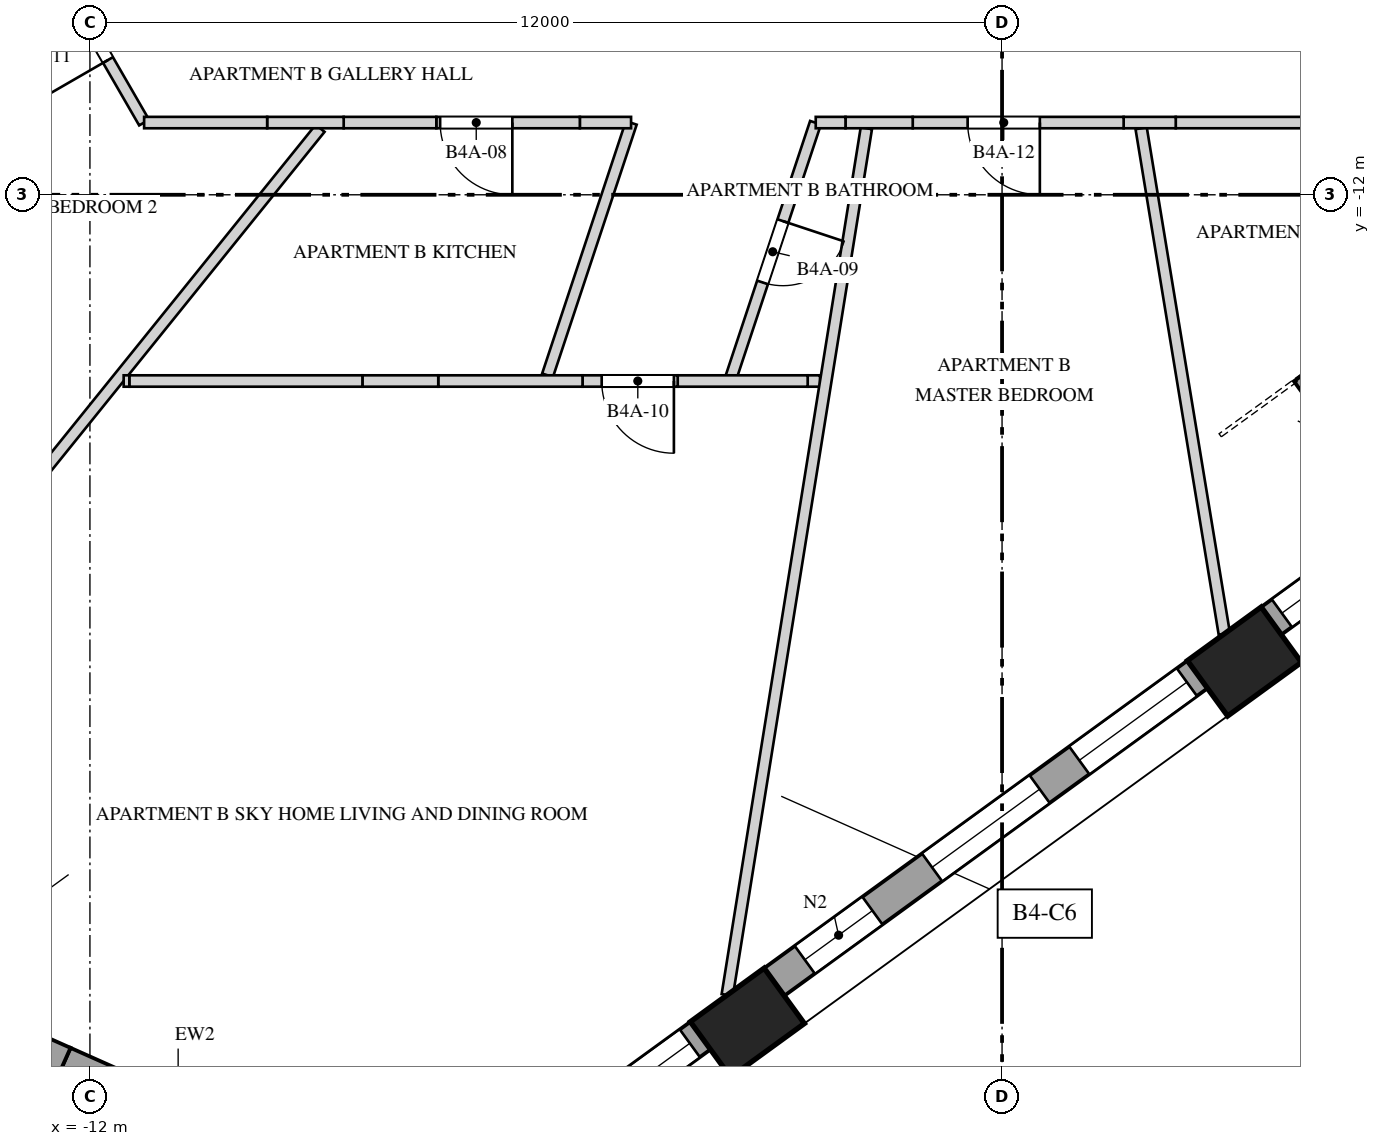
"""IFC4 building model, lengths in metres.
Left out: names, types, materials, properties, quantities, classifications, styles, units other than length and angle.
Written with IfcOpenShell. Run it as: python <this file> out.ifc"""

import sys

from ifc_helpers import new_model, si_unit, direction, frame, frame_2d, origin, origin_2d, place, context, subcontext, project, spatial, polyline, rectangle, outline, extrude, element, fill, save


model = new_model("IFC4")
c1 = context("Model", 3, precision=1e-05, world=origin(), true_north=direction((0.0, 1.0)))
c2 = subcontext(c1, "Body", "Model", "MODEL_VIEW")
j1 = project(units=[si_unit("LENGTHUNIT", "METRE"), si_unit("PLANEANGLEUNIT", "RADIAN")], contexts=[c1])
p1 = place(None, origin())
s1 = spatial("IfcSite", under=j1, at=p1, CompositionType="ELEMENT")
p2 = place(p1, origin())
s2 = spatial("IfcBuilding", under=s1, at=p2, CompositionType="ELEMENT")
p3 = place(p2, frame((0.0, 0.0, 162.8)))
s3 = spatial("IfcBuildingStorey", under=s2, at=p3, CompositionType="ELEMENT", Elevation=162.8)
for number, where, z_axis, x_axis in (
    (1, (-3.351, -22.891, -0.35), (0.0, 0.0, 1.0), (0.809, 0.588, 0.0)),
    (2, (3.189, -18.14, -0.35), (0.0, 0.0, 1.0), (0.809, 0.588, 0.0)),
):
    element("IfcColumn", number, at=place(p3, frame(where, z_axis=z_axis, x_axis=x_axis)), inside=s3, PredefinedType="COLUMN", context=c2, shape_type="SweptSolid", body=[
        extrude(rectangle(XDim=1.2, YDim=0.9, at=origin_2d()), origin(), (0.0, 0.0, 1.0), 4.35),
    ])
p4 = place(p3, frame((-8.97, -26.696, 0.0), z_axis=(0.0, 0.0, 1.0), x_axis=(0.809024567544, 0.587774828578, 0.0)))
e3 = element("IfcWall", 3, at=p4, inside=s3, PredefinedType="SOLIDWALL", context=c2, shape_type="SweptSolid", body=[
    extrude(rectangle(XDim=6.183, YDim=0.45, at=frame_2d((3.091, 0.0))), origin(), (0.0, 0.0, 1.0), 3.3),
])
p5 = place(p4, frame((0.147, 0.0, 0.5)))
e4 = element("IfcOpeningElement", 4, at=p5, cuts=e3, PredefinedType="OPENING", context=c2, shape_type="SweptSolid", body=[
    extrude(rectangle(XDim=1.1, YDim=2.0, at=frame_2d((0.55, 1.0))), frame((0.0, 0.235, 0.0), z_axis=(0.0, -1.0, 0.0), x_axis=(1.0, 0.0, 0.0)), (0.0, 0.0, 1.0), 0.47),
])
p6 = place(p4, frame((1.866, 0.0, 0.5)))
e5 = element("IfcOpeningElement", 5, at=p6, cuts=e3, PredefinedType="OPENING", context=c2, shape_type="SweptSolid", body=[
    extrude(rectangle(XDim=1.75, YDim=2.65, at=frame_2d((0.875, 1.325))), frame((0.0, 0.235, 0.0), z_axis=(0.0, -1.0, 0.0), x_axis=(1.0, 0.0, 0.0)), (0.0, 0.0, 1.0), 0.47),
])
p7 = place(p4, frame((4.261, 0.0, 0.5)))
e6 = element("IfcOpeningElement", 6, at=p7, cuts=e3, PredefinedType="OPENING", context=c2, shape_type="SweptSolid", body=[
    extrude(rectangle(XDim=1.75, YDim=2.65, at=frame_2d((0.875, 1.325))), frame((0.0, 0.235, 0.0), z_axis=(0.0, -1.0, 0.0), x_axis=(1.0, 0.0, 0.0)), (0.0, 0.0, 1.0), 0.47),
])
p8 = place(p3, frame((-2.997, -22.356, 0.0), z_axis=(0.0, 0.0, 1.0), x_axis=(0.809016690404, 0.587785670672, 0.0)))
e7 = element("IfcWall", 7, at=p8, inside=s3, PredefinedType="SOLIDWALL", context=c2, shape_type="SweptSolid", body=[
    extrude(rectangle(XDim=6.883, YDim=0.45, at=frame_2d((3.441, 0.0))), origin(), (0.0, 0.0, 1.0), 3.3),
])
p9 = place(p8, frame((0.497, 0.0, 0.5)))
e8 = element("IfcOpeningElement", 8, at=p9, cuts=e7, PredefinedType="OPENING", context=c2, shape_type="SweptSolid", body=[
    extrude(rectangle(XDim=1.1, YDim=2.65, at=frame_2d((0.55, 1.325))), frame((0.0, 0.235, 0.0), z_axis=(0.0, -1.0, 0.0), x_axis=(1.0, 0.0, 0.0)), (0.0, 0.0, 1.0), 0.47),
])
p10 = place(p8, frame((2.566, 0.0, 0.5)))
e9 = element("IfcOpeningElement", 9, at=p10, cuts=e7, PredefinedType="OPENING", context=c2, shape_type="SweptSolid", body=[
    extrude(rectangle(XDim=1.75, YDim=2.65, at=frame_2d((0.875, 1.325))), frame((0.0, 0.235, 0.0), z_axis=(0.0, -1.0, 0.0), x_axis=(1.0, 0.0, 0.0)), (0.0, 0.0, 1.0), 0.47),
])
p11 = place(p8, frame((4.961, 0.0, 0.5)))
e10 = element("IfcOpeningElement", 10, at=p11, cuts=e7, PredefinedType="OPENING", context=c2, shape_type="SweptSolid", body=[
    extrude(rectangle(XDim=1.75, YDim=2.65, at=frame_2d((0.875, 1.325))), frame((0.0, 0.235, 0.0), z_axis=(0.0, -1.0, 0.0), x_axis=(1.0, 0.0, 0.0)), (0.0, 0.0, 1.0), 0.47),
])
p12 = place(p3, frame((3.542, -17.605, 0.0), z_axis=(0.0, 0.0, 1.0), x_axis=(0.809028366311, 0.587769599847, 0.0)))
e11 = element("IfcWall", 11, at=p12, inside=s3, PredefinedType="SOLIDWALL", context=c2, shape_type="SweptSolid", body=[
    extrude(rectangle(XDim=2.094, YDim=0.45, at=frame_2d((1.047, 0.0))), origin(), (0.0, 0.0, 1.0), 3.3),
])
p13 = place(p12, frame((0.172, 0.0, 0.5)))
e12 = element("IfcOpeningElement", 12, at=p13, cuts=e11, PredefinedType="OPENING", context=c2, shape_type="SweptSolid", body=[
    extrude(rectangle(XDim=1.75, YDim=2.65, at=frame_2d((0.875, 1.325))), frame((0.0, 0.235, 0.0), z_axis=(0.0, -1.0, 0.0), x_axis=(1.0, 0.0, 0.0)), (0.0, 0.0, 1.0), 0.47),
])
p14 = place(p3, frame((5.754, -16.833, 0.0), z_axis=(0.0, 0.0, 1.0), x_axis=(-0.587776590479, 0.80902328748, 0.0)))
e13 = element("IfcWall", 13, at=p14, inside=s3, PredefinedType="SOLIDWALL", context=c2, shape_type="SweptSolid", body=[
    extrude(rectangle(XDim=3.05, YDim=0.3, at=frame_2d((1.525, 0.0))), origin(), (0.0, 0.0, 1.0), 3.3),
])
p15 = place(p3, frame((-9.241, -25.058, 0.0), z_axis=(0.0, 0.0, 1.0), x_axis=(-0.913549606868, 0.406727323635, 0.0)))
e14 = element("IfcWall", 14, at=p15, inside=s3, PredefinedType="SOLIDWALL", context=c2, shape_type="SweptSolid", body=[
    extrude(rectangle(XDim=3.5, YDim=0.9, at=frame_2d((1.75, 0.0))), origin(), (0.0, 0.0, 1.0), 3.3),
])
p16 = place(p15, frame((0.75, 0.0, 0.0)))
e15 = element("IfcOpeningElement", 15, at=p16, cuts=e14, PredefinedType="OPENING", context=c2, shape_type="SweptSolid", body=[
    extrude(rectangle(XDim=2.0, YDim=2.4, at=frame_2d((1.0, 1.2))), frame((0.0, 0.46, 0.0), z_axis=(0.0, -1.0, 0.0), x_axis=(1.0, 0.0, 0.0)), (0.0, 0.0, 1.0), 0.92),
])
p17 = place(p3, frame((-13.184, -24.757, 0.0), z_axis=(0.0, 0.0, 1.0), x_axis=(0.406698557215, 0.913562413609, 0.0)))
e16 = element("IfcWall", 16, at=p17, inside=s3, PredefinedType="SOLIDWALL", context=c2, shape_type="SweptSolid", body=[
    extrude(rectangle(XDim=1.779, YDim=0.45, at=frame_2d((0.89, 0.0))), origin(), (0.0, 0.0, 1.0), 2.55),
])
p18 = place(p3, frame((-14.322, -17.76, 0.0), z_axis=(0.0, 0.0, 1.0), x_axis=(0.627722219301, 0.778437419062, 0.0)))
e17 = element("IfcWall", 17, at=p18, inside=s3, PredefinedType="PARTITIONING", context=c2, shape_type="SweptSolid", body=[
    extrude(rectangle(XDim=8.524, YDim=0.15, at=frame_2d((4.262, 0.0))), origin(), (0.0, 0.0, 1.0), 2.75),
])
p19 = place(p3, frame((-11.287, -11.05, 0.0), z_axis=(0.0, 0.0, 1.0), x_axis=(-0.499958377808, 0.866049433035, 0.0)))
e18 = element("IfcWall", 18, at=p19, inside=s3, PredefinedType="PARTITIONING", context=c2, shape_type="SweptSolid", body=[
    extrude(rectangle(XDim=3.046, YDim=0.15, at=frame_2d((1.523, 0.0))), origin(), (0.0, 0.0, 1.0), 3.65),
])
p20 = place(p19, frame((0.95, 0.0, 0.0)))
e19 = element("IfcOpeningElement", 19, at=p20, cuts=e18, PredefinedType="OPENING", context=c2, shape_type="SweptSolid", body=[
    extrude(rectangle(XDim=0.95, YDim=2.4, at=frame_2d((0.475, 1.2))), frame((0.0, 0.085, 0.0), z_axis=(0.0, -1.0, 0.0), x_axis=(1.0, 0.0, 0.0)), (0.0, 0.0, 1.0), 0.17),
])
p21 = place(p3, frame((-5.979, -14.375, 0.0), z_axis=(0.0, 0.0, 1.0), x_axis=(0.314824942326, 0.94914975409, 0.0)))
e20 = element("IfcWall", 20, at=p21, inside=s3, PredefinedType="PARTITIONING", context=c2, shape_type="SweptSolid", body=[
    extrude(rectangle(XDim=3.499, YDim=0.15, at=frame_2d((1.75, 0.0))), origin(), (0.0, 0.0, 1.0), 3.65),
])
p22 = place(p3, frame((-4.881, -11.05, 0.0), z_axis=(0.0, 0.0, 1.0), x_axis=(-1.0, 0.0, 0.0)))
e21 = element("IfcWall", 21, at=p22, inside=s3, PredefinedType="PARTITIONING", context=c2, shape_type="SweptSolid", body=[
    extrude(rectangle(XDim=0.674, YDim=0.15, at=frame_2d((0.337, 0.0))), origin(), (0.0, 0.0, 1.0), 3.65),
])
p23 = place(p3, frame((-5.555, -11.05, 0.0), z_axis=(0.0, 0.0, 1.0), x_axis=(-1.0, 0.0, 0.0)))
e22 = element("IfcWall", 22, at=p23, inside=s3, PredefinedType="PARTITIONING", context=c2, shape_type="SweptSolid", body=[
    extrude(outline(polyline([(0.0, 0.0), (1.888, 0.0), (1.888, 3.65), (0.998, 3.65), (0.998, 2.55), (0.0, 2.55), (0.0, 0.0)])), frame((0.0, 0.075, 0.0), z_axis=(0.0, -1.0, 0.0), x_axis=(1.0, 0.0, 0.0)), (0.0, 0.0, 1.0), 0.15),
])
p24 = place(p23, frame((0.888, 0.0, 0.0)))
e23 = element("IfcOpeningElement", 23, at=p24, cuts=e22, PredefinedType="OPENING", context=c2, shape_type="SweptSolid", body=[
    extrude(rectangle(XDim=0.95, YDim=2.4, at=frame_2d((0.475, 1.2))), frame((0.0, 0.085, 0.0), z_axis=(0.0, -1.0, 0.0), x_axis=(1.0, 0.0, 0.0)), (0.0, 0.0, 1.0), 0.17),
])
p25 = place(p3, frame((-7.443, -11.05, 0.0), z_axis=(0.0, 0.0, 1.0), x_axis=(-1.0, 0.0, 0.0)))
e24 = element("IfcWall", 24, at=p25, inside=s3, PredefinedType="PARTITIONING", context=c2, shape_type="SweptSolid", body=[
    extrude(rectangle(XDim=1.219, YDim=0.15, at=frame_2d((0.609, 0.0))), origin(), (0.0, 0.0, 1.0), 3.65),
])
p26 = place(p3, frame((-8.662, -11.05, 0.0), z_axis=(0.0, 0.0, 1.0), x_axis=(-1.0, 0.0, 0.0)))
e25 = element("IfcWall", 25, at=p26, inside=s3, PredefinedType="PARTITIONING", context=c2, shape_type="SweptSolid", body=[
    extrude(rectangle(XDim=1.007, YDim=0.15, at=frame_2d((0.503, 0.0))), origin(), (0.0, 0.0, 1.0), 2.75),
])
p27 = place(p3, frame((-9.668, -11.05, 0.0), z_axis=(0.0, 0.0, 1.0), x_axis=(-1.0, 0.0, 0.0)))
e26 = element("IfcWall", 26, at=p27, inside=s3, PredefinedType="PARTITIONING", context=c2, shape_type="SweptSolid", body=[
    extrude(rectangle(XDim=1.619, YDim=0.15, at=frame_2d((0.809, 0.0))), origin(), (0.0, 0.0, 1.0), 3.65),
])
p28 = place(p3, frame((-2.454, -11.052, 0.0), z_axis=(0.0, 0.0, 1.0), x_axis=(-0.314794041052, -0.949160003223, 0.0)))
e27 = element("IfcWall", 27, at=p28, inside=s3, PredefinedType="PARTITIONING", context=c2, shape_type="SweptSolid", body=[
    extrude(rectangle(XDim=3.577, YDim=0.15, at=frame_2d((1.789, 0.0))), origin(), (0.0, 0.0, 1.0), 3.65),
])
p29 = place(p28, frame((1.364, 0.0, 0.0)))
e28 = element("IfcOpeningElement", 28, at=p29, cuts=e27, PredefinedType="OPENING", context=c2, shape_type="SweptSolid", body=[
    extrude(rectangle(XDim=0.85, YDim=2.4, at=frame_2d((0.425, 1.2))), frame((0.0, 0.085, 0.0), z_axis=(0.0, -1.0, 0.0), x_axis=(1.0, 0.0, 0.0)), (0.0, 0.0, 1.0), 0.17),
])
p30 = place(p3, frame((-2.395, -14.45, 0.0), z_axis=(0.0, 0.0, 1.0), x_axis=(-1.0, 0.0, 0.0)))
e29 = element("IfcWall", 29, at=p30, inside=s3, PredefinedType="PARTITIONING", context=c2, shape_type="SweptSolid", body=[
    extrude(rectangle(XDim=0.162, YDim=0.15, at=frame_2d((0.081, 0.0))), origin(), (0.0, 0.0, 1.0), 2.55),
])
p31 = place(p3, frame((-2.557, -14.45, 0.0), z_axis=(0.0, 0.0, 1.0), x_axis=(-1.0, 0.0, 0.0)))
e30 = element("IfcWall", 30, at=p31, inside=s3, PredefinedType="PARTITIONING", context=c2, shape_type="SweptSolid", body=[
    extrude(rectangle(XDim=1.71, YDim=0.15, at=frame_2d((0.855, 0.0))), origin(), (0.0, 0.0, 1.0), 3.65),
])
p32 = place(p3, frame((-4.267, -14.45, 0.0), z_axis=(0.0, 0.0, 1.0), x_axis=(-1.0, 0.0, 0.0)))
e31 = element("IfcWall", 31, at=p32, inside=s3, PredefinedType="PARTITIONING", context=c2, shape_type="SweptSolid", body=[
    extrude(outline(polyline([(0.0, 0.0), (1.252, 0.0), (1.252, 2.55), (0.325, 2.55), (0.325, 3.65), (0.0, 3.65), (0.0, 0.0)])), frame((0.0, 0.075, 0.0), z_axis=(0.0, -1.0, 0.0), x_axis=(1.0, 0.0, 0.0)), (0.0, 0.0, 1.0), 0.15),
])
p33 = place(p32, frame((0.05, 0.0, 0.0)))
e32 = element("IfcOpeningElement", 32, at=p33, cuts=e31, PredefinedType="OPENING", context=c2, shape_type="SweptSolid", body=[
    extrude(rectangle(XDim=0.95, YDim=2.4, at=frame_2d((0.475, 1.2))), frame((0.0, 0.085, 0.0), z_axis=(0.0, -1.0, 0.0), x_axis=(1.0, 0.0, 0.0)), (0.0, 0.0, 1.0), 0.17),
])
p34 = place(p3, frame((-5.52, -14.45, 0.0), z_axis=(0.0, 0.0, 1.0), x_axis=(-1.0, 0.0, 0.0)))
e33 = element("IfcWall", 33, at=p34, inside=s3, PredefinedType="PARTITIONING", context=c2, shape_type="SweptSolid", body=[
    extrude(rectangle(XDim=1.898, YDim=0.15, at=frame_2d((0.949, 0.0))), origin(), (0.0, 0.0, 1.0), 3.65),
])
p35 = place(p3, frame((-7.417, -14.45, 0.0), z_axis=(0.0, 0.0, 1.0), x_axis=(-1.0, 0.0, 0.0)))
e34 = element("IfcWall", 34, at=p35, inside=s3, PredefinedType="PARTITIONING", context=c2, shape_type="SweptSolid", body=[
    extrude(rectangle(XDim=0.998, YDim=0.15, at=frame_2d((0.499, 0.0))), origin(), (0.0, 0.0, 1.0), 2.55),
])
p36 = place(p3, frame((-8.415, -14.45, 0.0), z_axis=(0.0, 0.0, 1.0), x_axis=(-1.0, 0.0, 0.0)))
e35 = element("IfcWall", 35, at=p36, inside=s3, PredefinedType="PARTITIONING", context=c2, shape_type="SweptSolid", body=[
    extrude(rectangle(XDim=3.067, YDim=0.15, at=frame_2d((1.533, 0.0))), origin(), (0.0, 0.0, 1.0), 3.65),
])
p37 = place(p3, frame((-11.482, -14.45, 0.0), z_axis=(0.0, 0.0, 1.0), x_axis=(-1.0, 0.0, 0.0)))
e36 = element("IfcWall", 36, at=p37, inside=s3, PredefinedType="PARTITIONING", context=c2, shape_type="SweptSolid", body=[
    extrude(rectangle(XDim=0.075, YDim=0.15, at=frame_2d((0.037, 0.0))), origin(), (0.0, 0.0, 1.0), 2.75),
])
p38 = place(p3, frame((-1.785, -11.125, 0.0), z_axis=(0.0, 0.0, 1.0), x_axis=(-0.158434092998, -0.987369555018, 0.0)))
e37 = element("IfcWall", 37, at=p38, inside=s3, PredefinedType="PARTITIONING", context=c2, shape_type="SweptSolid", body=[
    extrude(rectangle(XDim=11.548, YDim=0.15, at=frame_2d((5.774, 0.0))), origin(), (0.0, 0.0, 1.0), 2.55),
])
p39 = place(p3, frame((1.83, -11.125, 0.0), z_axis=(0.0, 0.0, 1.0), x_axis=(0.162301772149, -0.98674116908, 0.0)))
e38 = element("IfcWall", 38, at=p39, inside=s3, PredefinedType="PARTITIONING", context=c2, shape_type="SweptSolid", body=[
    extrude(rectangle(XDim=6.74, YDim=0.15, at=frame_2d((3.37, 0.0))), origin(), (0.0, 0.0, 1.0), 2.95),
])
p40 = place(p3, frame((7.611, -11.05, 0.0), z_axis=(0.0, 0.0, 1.0), x_axis=(-1.0, 0.0, 0.0)))
e39 = element("IfcWall", 39, at=p40, inside=s3, PredefinedType="PARTITIONING", context=c2, shape_type="SweptSolid", body=[
    extrude(rectangle(XDim=5.326, YDim=0.15, at=frame_2d((2.663, 0.0))), origin(), (0.0, 0.0, 1.0), 3.65),
])
p41 = place(p40, frame((2.312, 0.0, 0.0)))
e40 = element("IfcOpeningElement", 40, at=p41, cuts=e39, PredefinedType="OPENING", context=c2, shape_type="SweptSolid", body=[
    extrude(rectangle(XDim=0.95, YDim=2.4, at=frame_2d((0.475, 1.2))), frame((0.0, 0.085, 0.0), z_axis=(0.0, -1.0, 0.0), x_axis=(1.0, 0.0, 0.0)), (0.0, 0.0, 1.0), 0.17),
])
p42 = place(p3, frame((2.285, -11.05, 0.0), z_axis=(0.0, 0.0, 1.0), x_axis=(-1.0, 0.0, 0.0)))
e41 = element("IfcWall", 41, at=p42, inside=s3, PredefinedType="PARTITIONING", context=c2, shape_type="SweptSolid", body=[
    extrude(rectangle(XDim=0.685, YDim=0.15, at=frame_2d((0.343, 0.0))), origin(), (0.0, 0.0, 1.0), 2.95),
])
p43 = place(p3, frame((1.6, -11.05, 0.0), z_axis=(0.0, 0.0, 1.0), x_axis=(-1.0, 0.0, 0.0)))
e42 = element("IfcWall", 42, at=p43, inside=s3, PredefinedType="PARTITIONING", context=c2, shape_type="SweptSolid", body=[
    extrude(rectangle(XDim=2.775, YDim=0.15, at=frame_2d((1.387, 0.0))), origin(), (0.0, 0.0, 1.0), 3.65),
])
p44 = place(p43, frame((1.103, 0.0, 0.0)))
e43 = element("IfcOpeningElement", 43, at=p44, cuts=e42, PredefinedType="OPENING", context=c2, shape_type="SweptSolid", body=[
    extrude(rectangle(XDim=0.95, YDim=2.4, at=frame_2d((0.475, 1.2))), frame((0.0, 0.085, 0.0), z_axis=(0.0, -1.0, 0.0), x_axis=(1.0, 0.0, 0.0)), (0.0, 0.0, 1.0), 0.17),
])
p45 = place(p3, frame((-1.175, -11.05, 0.0), z_axis=(0.0, 0.0, 1.0), x_axis=(-1.0, 0.0, 0.0)))
e44 = element("IfcWall", 44, at=p45, inside=s3, PredefinedType="PARTITIONING", context=c2, shape_type="SweptSolid", body=[
    extrude(rectangle(XDim=0.884, YDim=0.15, at=frame_2d((0.442, 0.0))), origin(), (0.0, 0.0, 1.0), 2.55),
])
p46 = place(p3, frame((-2.06, -11.05, 0.0), z_axis=(0.0, 0.0, 1.0), x_axis=(-1.0, 0.0, 0.0)))
e45 = element("IfcWall", 45, at=p46, inside=s3, PredefinedType="PARTITIONING", context=c2, shape_type="SweptSolid", body=[
    extrude(rectangle(XDim=0.392, YDim=0.15, at=frame_2d((0.196, 0.0))), origin(), (0.0, 0.0, 1.0), 3.65),
])
p47 = place(p7, origin())
e46 = element("IfcWindow", 46, at=p47, inside=s3, PartitioningType="SINGLE_PANEL", PredefinedType="WINDOW", context=c2, shape_type="SweptSolid", body=[
    extrude(rectangle(XDim=1.75, YDim=2.65, at=frame_2d((0.875, 1.325))), frame((0.0, 0.03, 0.0), z_axis=(0.0, -1.0, 0.0), x_axis=(1.0, 0.0, 0.0)), (0.0, 0.0, 1.0), 0.06),
])
fill(e6, e46)
p48 = place(p9, origin())
e47 = element("IfcWindow", 47, at=p48, inside=s3, PartitioningType="SINGLE_PANEL", PredefinedType="WINDOW", context=c2, shape_type="SweptSolid", body=[
    extrude(rectangle(XDim=1.1, YDim=2.65, at=frame_2d((0.55, 1.325))), frame((0.0, 0.03, 0.0), z_axis=(0.0, -1.0, 0.0), x_axis=(1.0, 0.0, 0.0)), (0.0, 0.0, 1.0), 0.06),
])
fill(e8, e47)
p49 = place(p10, origin())
e48 = element("IfcWindow", 48, at=p49, inside=s3, PartitioningType="SINGLE_PANEL", PredefinedType="WINDOW", context=c2, shape_type="SweptSolid", body=[
    extrude(rectangle(XDim=1.75, YDim=2.65, at=frame_2d((0.875, 1.325))), frame((0.0, 0.03, 0.0), z_axis=(0.0, -1.0, 0.0), x_axis=(1.0, 0.0, 0.0)), (0.0, 0.0, 1.0), 0.06),
])
fill(e9, e48)
p50 = place(p11, origin())
e49 = element("IfcWindow", 49, at=p50, inside=s3, PartitioningType="SINGLE_PANEL", PredefinedType="WINDOW", context=c2, shape_type="SweptSolid", body=[
    extrude(rectangle(XDim=1.75, YDim=2.65, at=frame_2d((0.875, 1.325))), frame((0.0, 0.03, 0.0), z_axis=(0.0, -1.0, 0.0), x_axis=(1.0, 0.0, 0.0)), (0.0, 0.0, 1.0), 0.06),
])
fill(e10, e49)
p51 = place(p13, origin())
e50 = element("IfcWindow", 50, at=p51, inside=s3, PartitioningType="SINGLE_PANEL", PredefinedType="WINDOW", context=c2, shape_type="SweptSolid", body=[
    extrude(rectangle(XDim=1.75, YDim=2.65, at=frame_2d((0.875, 1.325))), frame((0.0, 0.03, 0.0), z_axis=(0.0, -1.0, 0.0), x_axis=(1.0, 0.0, 0.0)), (0.0, 0.0, 1.0), 0.06),
])
fill(e12, e50)
p52 = place(p24, origin())
e51 = element("IfcDoor", 51, at=p52, inside=s3, OperationType="SINGLE_SWING_RIGHT", PredefinedType="DOOR", context=c2, shape_type="SweptSolid", body=[
    extrude(rectangle(XDim=0.95, YDim=2.4, at=frame_2d((0.475, 1.2))), frame((0.0, 0.025, 0.0), z_axis=(0.0, -1.0, 0.0), x_axis=(1.0, 0.0, 0.0)), (0.0, 0.0, 1.0), 0.05),
])
fill(e23, e51)
p53 = place(p29, origin())
e52 = element("IfcDoor", 52, at=p53, inside=s3, OperationType="SINGLE_SWING_LEFT", PredefinedType="DOOR", context=c2, shape_type="SweptSolid", body=[
    extrude(rectangle(XDim=0.85, YDim=2.4, at=frame_2d((0.425, 1.2))), frame((0.0, 0.025, 0.0), z_axis=(0.0, -1.0, 0.0), x_axis=(1.0, 0.0, 0.0)), (0.0, 0.0, 1.0), 0.05),
])
fill(e28, e52)
p54 = place(p33, origin())
e53 = element("IfcDoor", 53, at=p54, inside=s3, OperationType="SINGLE_SWING_RIGHT", PredefinedType="DOOR", context=c2, shape_type="SweptSolid", body=[
    extrude(rectangle(XDim=0.95, YDim=2.4, at=frame_2d((0.475, 1.2))), frame((0.0, 0.025, 0.0), z_axis=(0.0, -1.0, 0.0), x_axis=(1.0, 0.0, 0.0)), (0.0, 0.0, 1.0), 0.05),
])
fill(e32, e53)
p55 = place(p20, origin())
e54 = element("IfcDoor", 54, at=p55, inside=s3, OperationType="SINGLE_SWING_LEFT", PredefinedType="DOOR", context=c2, shape_type="SweptSolid", body=[
    extrude(rectangle(XDim=0.95, YDim=2.4, at=frame_2d((0.475, 1.2))), frame((0.0, 0.025, 0.0), z_axis=(0.0, -1.0, 0.0), x_axis=(1.0, 0.0, 0.0)), (0.0, 0.0, 1.0), 0.05),
])
fill(e19, e54)
p56 = place(p44, origin())
e55 = element("IfcDoor", 55, at=p56, inside=s3, OperationType="SINGLE_SWING_RIGHT", PredefinedType="DOOR", context=c2, shape_type="SweptSolid", body=[
    extrude(rectangle(XDim=0.95, YDim=2.4, at=frame_2d((0.475, 1.2))), frame((0.0, 0.025, 0.0), z_axis=(0.0, -1.0, 0.0), x_axis=(1.0, 0.0, 0.0)), (0.0, 0.0, 1.0), 0.05),
])
fill(e43, e55)
save(model, sys.argv[1])
